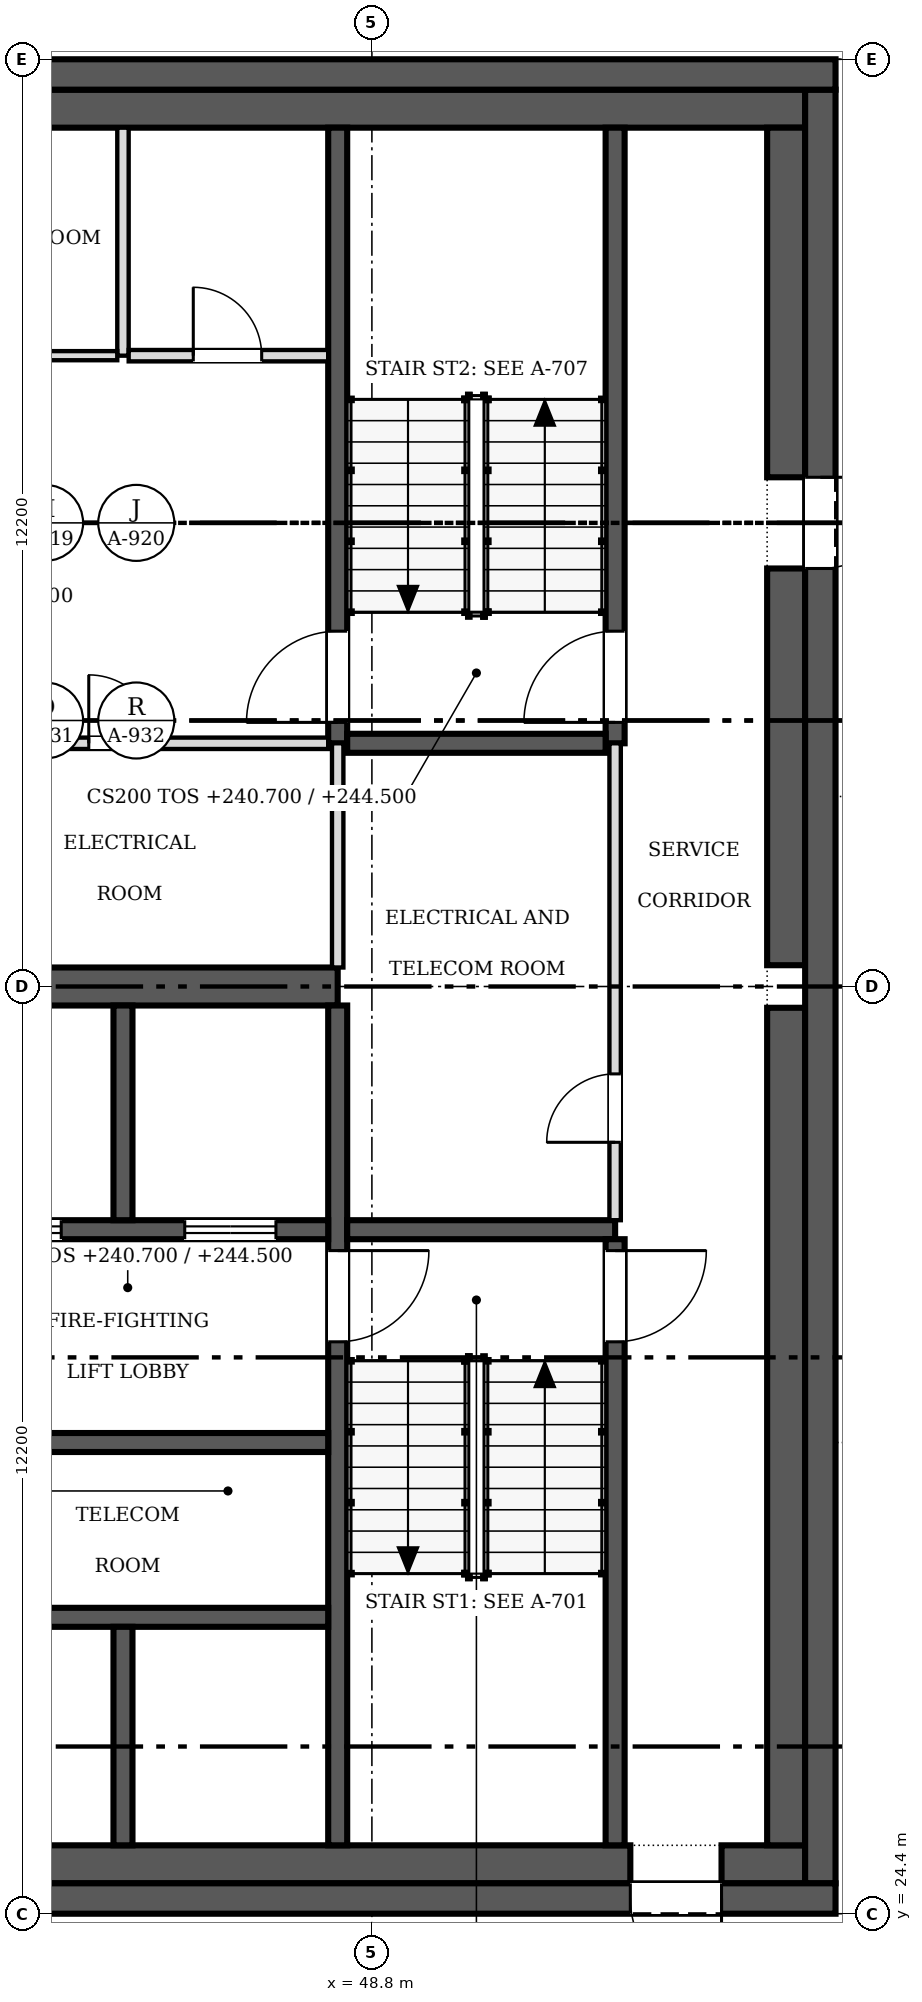
"""IFC4 building model, lengths in metres.
Left out: names, types, materials, properties, quantities, classifications, styles, units other than length and angle.
Written with IfcOpenShell. Run it as: python <this file> out.ifc"""

import sys

from ifc_helpers import new_model, si_unit, direction, frame, frame_2d, origin, place, context, subcontext, project, spatial, rectangle, extrude, source, transform, mapped, element, fill, save


model = new_model("IFC4")
c1 = context("Model", 3, precision=1e-05, world=origin(), true_north=direction((0.0, 1.0)))
c2 = subcontext(c1, "Body", "Model", "MODEL_VIEW")
j1 = project(units=[si_unit("LENGTHUNIT", "METRE"), si_unit("PLANEANGLEUNIT", "RADIAN")], contexts=[c1])
p1 = place(None, origin())
s1 = spatial("IfcSite", under=j1, at=p1, CompositionType="ELEMENT")
p2 = place(p1, origin())
s2 = spatial("IfcBuilding", under=s1, at=p2, CompositionType="ELEMENT")
p3 = place(p2, frame((0.0, 0.0, 240.7)))
s3 = spatial("IfcBuildingStorey", under=s2, at=p3, CompositionType="ELEMENT", Elevation=240.7)
p4 = place(p3, frame((54.9, 24.6, 0.0), z_axis=(0.0, 0.0, 1.0), x_axis=(-1.0, 0.0, 0.0)))
e1 = element("IfcWall", 1, at=p4, inside=s3, PredefinedType="SHEAR", context=c2, shape_type="SweptSolid", body=[
    extrude(rectangle(XDim=24.4, YDim=0.4, at=frame_2d((12.2, 0.0))), origin(), (0.0, 0.0, 1.0), 3.8),
])
m1 = source(origin(), c2, "Body", "SweptSolid", [
    extrude(rectangle(XDim=1.2, YDim=2.1, at=frame_2d((0.6, 1.05))), frame((0.0, 0.21, 0.0), z_axis=(0.0, -1.0, 0.0), x_axis=(1.0, 0.0, 0.0)), (0.0, 0.0, 1.0), 0.42),
])
p5 = place(p4, frame((1.5, 0.0, 0.0)))
e2 = element("IfcOpeningElement", 2, at=p5, cuts=e1, PredefinedType="OPENING", context=c2, shape_type="MappedRepresentation", body=[
    mapped(m1, transform((0.0, 0.0, 0.0), scale=1.0)),
])
p6 = place(p3, frame((30.5, 48.6, 0.0), z_axis=(0.0, 0.0, 1.0), x_axis=(1.0, 0.0, 0.0)))
e3 = element("IfcWall", 3, at=p6, inside=s3, PredefinedType="SHEAR", context=c2, shape_type="SweptSolid", body=[
    extrude(rectangle(XDim=24.4, YDim=0.4, at=frame_2d((12.2, 0.0))), origin(), (0.0, 0.0, 1.0), 3.8),
])
p7 = place(p3, frame((54.7, 48.4, 0.0), z_axis=(0.0, 0.0, 1.0), x_axis=(0.0, -1.0, 0.0)))
e4 = element("IfcWall", 4, at=p7, inside=s3, PredefinedType="SHEAR", context=c2, shape_type="SweptSolid", body=[
    extrude(rectangle(XDim=23.6, YDim=0.4, at=frame_2d((11.8, 0.0))), origin(), (0.0, 0.0, 1.0), 3.8),
])
p8 = place(p7, frame((5.1, 0.0, 0.0)))
e5 = element("IfcOpeningElement", 5, at=p8, cuts=e4, PredefinedType="OPENING", context=c2, shape_type="MappedRepresentation", body=[
    mapped(m1, transform((0.0, 0.0, 0.0), scale=1.0)),
])
p9 = place(p3, frame((30.9, 25.05, 0.0), z_axis=(0.0, 0.0, 1.0), x_axis=(1.0, 0.0, 0.0)))
e6 = element("IfcWall", 6, at=p9, inside=s3, PredefinedType="SOLIDWALL", context=c2, shape_type="SweptSolid", body=[
    extrude(rectangle(XDim=21.3, YDim=0.5, at=frame_2d((10.65, 0.0))), origin(), (0.0, 0.0, 1.0), 3.8),
])
p10 = place(p3, frame((53.4, 25.05, 0.0), z_axis=(0.0, 0.0, 1.0), x_axis=(1.0, 0.0, 0.0)))
e7 = element("IfcWall", 7, at=p10, inside=s3, PredefinedType="SOLIDWALL", context=c2, shape_type="SweptSolid", body=[
    extrude(rectangle(XDim=1.1, YDim=0.5, at=frame_2d((0.55, 0.0))), origin(), (0.0, 0.0, 1.0), 3.8),
])
p11 = place(p3, frame((30.9, 48.15, 0.0), z_axis=(0.0, 0.0, 1.0), x_axis=(1.0, 0.0, 0.0)))
e8 = element("IfcWall", 8, at=p11, inside=s3, PredefinedType="SOLIDWALL", context=c2, shape_type="SweptSolid", body=[
    extrude(rectangle(XDim=23.6, YDim=0.5, at=frame_2d((11.8, 0.0))), origin(), (0.0, 0.0, 1.0), 3.8),
])
p12 = place(p3, frame((54.25, 25.3, 0.0), z_axis=(0.0, 0.0, 1.0), x_axis=(0.0, 1.0, 0.0)))
e9 = element("IfcWall", 9, at=p12, inside=s3, PredefinedType="SOLIDWALL", context=c2, shape_type="SweptSolid", body=[
    extrude(rectangle(XDim=11.02, YDim=0.5, at=frame_2d((5.51, 0.0))), origin(), (0.0, 0.0, 1.0), 3.8),
])
p13 = place(p3, frame((54.25, 36.88, 0.0), z_axis=(0.0, 0.0, 1.0), x_axis=(0.0, 1.0, 0.0)))
e10 = element("IfcWall", 10, at=p13, inside=s3, PredefinedType="SOLIDWALL", context=c2, shape_type="SweptSolid", body=[
    extrude(rectangle(XDim=5.22, YDim=0.5, at=frame_2d((2.61, 0.0))), origin(), (0.0, 0.0, 1.0), 3.8),
])
p14 = place(p3, frame((54.25, 43.3, 0.0), z_axis=(0.0, 0.0, 1.0), x_axis=(0.0, 1.0, 0.0)))
e11 = element("IfcWall", 11, at=p14, inside=s3, PredefinedType="SOLIDWALL", context=c2, shape_type="SweptSolid", body=[
    extrude(rectangle(XDim=4.6, YDim=0.5, at=frame_2d((2.3, 0.0))), origin(), (0.0, 0.0, 1.0), 3.8),
])
p15 = place(p3, frame((31.4, 36.6, 0.0), z_axis=(0.0, 0.0, 1.0), x_axis=(1.0, 0.0, 0.0)))
e12 = element("IfcWall", 12, at=p15, inside=s3, PredefinedType="SHEAR", context=c2, shape_type="SweptSolid", body=[
    extrude(rectangle(XDim=16.95, YDim=0.5, at=frame_2d((8.475, 0.0))), origin(), (0.0, 0.0, 1.0), 3.8),
])
p16 = place(p3, frame((48.35, 36.35, 0.0), z_axis=(0.0, 0.0, 1.0), x_axis=(0.0, -1.0, 0.0)))
e13 = element("IfcWall", 13, at=p16, inside=s3, PredefinedType="SOLIDWALL", context=c2, shape_type="SweptSolid", body=[
    extrude(rectangle(XDim=11.05, YDim=0.25, at=frame_2d((5.525, 0.0))), origin(), (0.0, 0.0, 1.0), 3.8),
])
m2 = source(origin(), c2, "Body", "SweptSolid", [
    extrude(rectangle(XDim=1.2, YDim=2.1, at=frame_2d((0.6, 1.05))), frame((0.0, 0.135, 0.0), z_axis=(0.0, -1.0, 0.0), x_axis=(1.0, 0.0, 0.0)), (0.0, 0.0, 1.0), 0.27),
])
p17 = place(p16, frame((3.225, 0.0, 0.0)))
e14 = element("IfcOpeningElement", 14, at=p17, cuts=e13, PredefinedType="OPENING", context=c2, shape_type="MappedRepresentation", body=[
    mapped(m2, transform((0.0, 0.0, 0.0), scale=1.0)),
])
p18 = place(p3, frame((48.225, 33.4, 0.0), z_axis=(0.0, 0.0, 1.0), x_axis=(-1.0, 0.0, 0.0)))
e15 = element("IfcWall", 15, at=p18, inside=s3, PredefinedType="SOLIDWALL", context=c2, shape_type="SweptSolid", body=[
    extrude(rectangle(XDim=5.275, YDim=0.25, at=frame_2d((2.638, 0.0))), origin(), (0.0, 0.0, 1.0), 3.8),
])
p19 = place(p18, frame((3.512, 0.0, 0.0)))
e16 = element("IfcOpeningElement", 16, at=p19, cuts=e15, PredefinedType="OPENING", context=c2, shape_type="MappedRepresentation", body=[
    mapped(m2, transform((0.0, 0.0, 0.0), scale=1.0)),
])
p20 = place(p18, frame((0.688, 0.0, 0.0)))
e17 = element("IfcOpeningElement", 17, at=p20, cuts=e15, PredefinedType="OPENING", context=c2, shape_type="MappedRepresentation", body=[
    mapped(m2, transform((0.0, 0.0, 0.0), scale=1.0)),
])
p21 = place(p3, frame((48.475, 33.4, 0.0), z_axis=(0.0, 0.0, 1.0), x_axis=(1.0, 0.0, 0.0)))
e18 = element("IfcWall", 18, at=p21, inside=s3, PredefinedType="SOLIDWALL", context=c2, shape_type="SweptSolid", body=[
    extrude(rectangle(XDim=3.525, YDim=0.25, at=frame_2d((1.762, 0.0))), origin(), (0.0, 0.0, 1.0), 3.8),
])
p22 = place(p3, frame((48.35, 47.9, 0.0), z_axis=(0.0, 0.0, 1.0), x_axis=(0.0, -1.0, 0.0)))
e19 = element("IfcWall", 19, at=p22, inside=s3, PredefinedType="SOLIDWALL", context=c2, shape_type="SweptSolid", body=[
    extrude(rectangle(XDim=8.1, YDim=0.25, at=frame_2d((4.05, 0.0))), origin(), (0.0, 0.0, 1.0), 3.8),
])
p23 = place(p22, frame((6.625, 0.0, 0.0)))
e20 = element("IfcOpeningElement", 20, at=p23, cuts=e19, PredefinedType="OPENING", context=c2, shape_type="MappedRepresentation", body=[
    mapped(m2, transform((0.0, 0.0, 0.0), scale=1.0)),
])
p24 = place(p3, frame((52.0, 25.3, 0.0), z_axis=(0.0, 0.0, 1.0), x_axis=(0.0, 1.0, 0.0)))
e21 = element("IfcWall", 21, at=p24, inside=s3, PredefinedType="SOLIDWALL", context=c2, shape_type="SweptSolid", body=[
    extrude(rectangle(XDim=7.975, YDim=0.25, at=frame_2d((3.987, 0.0))), origin(), (0.0, 0.0, 1.0), 3.8),
])
p25 = place(p24, frame((6.625, 0.0, 0.0)))
e22 = element("IfcOpeningElement", 22, at=p25, cuts=e21, PredefinedType="OPENING", context=c2, shape_type="MappedRepresentation", body=[
    mapped(m2, transform((0.0, 0.0, 0.0), scale=1.0)),
])
p26 = place(p3, frame((52.0, 39.8, 0.0), z_axis=(0.0, 0.0, 1.0), x_axis=(0.0, 1.0, 0.0)))
e23 = element("IfcWall", 23, at=p26, inside=s3, PredefinedType="SOLIDWALL", context=c2, shape_type="SweptSolid", body=[
    extrude(rectangle(XDim=8.1, YDim=0.25, at=frame_2d((4.05, 0.0))), origin(), (0.0, 0.0, 1.0), 3.8),
])
p27 = place(p26, frame((0.275, 0.0, 0.0)))
e24 = element("IfcOpeningElement", 24, at=p27, cuts=e23, PredefinedType="OPENING", context=c2, shape_type="MappedRepresentation", body=[
    mapped(m2, transform((0.0, 0.0, 0.0), scale=1.0)),
])
for number, where, z_axis, x_axis in (
    (25, (42.95, 28.3, 0.0), (0.0, 0.0, 1.0), (1.0, 0.0, 0.0)),
    (26, (42.95, 30.6, 0.0), (0.0, 0.0, 1.0), (1.0, 0.0, 0.0)),
):
    element("IfcWall", number, at=place(p3, frame(where, z_axis=z_axis, x_axis=x_axis)), inside=s3, PredefinedType="SOLIDWALL", context=c2, shape_type="SweptSolid", body=[
        extrude(rectangle(XDim=5.275, YDim=0.25, at=frame_2d((2.638, 0.0))), origin(), (0.0, 0.0, 1.0), 3.8),
    ])
p28 = place(p3, frame((48.475, 39.8, 0.0), z_axis=(0.0, 0.0, 1.0), x_axis=(1.0, 0.0, 0.0)))
e27 = element("IfcWall", 27, at=p28, inside=s3, PredefinedType="SOLIDWALL", context=c2, shape_type="SweptSolid", body=[
    extrude(rectangle(XDim=3.4, YDim=0.25, at=frame_2d((1.7, 0.0))), origin(), (0.0, 0.0, 1.0), 3.8),
])
p29 = place(p3, frame((45.525, 33.525, 0.0), z_axis=(0.0, 0.0, 1.0), x_axis=(0.0, 1.0, 0.0)))
e28 = element("IfcWall", 28, at=p29, inside=s3, PredefinedType="SOLIDWALL", context=c2, shape_type="SweptSolid", body=[
    extrude(rectangle(XDim=2.825, YDim=0.25, at=frame_2d((1.413, 0.0))), origin(), (0.0, 0.0, 1.0), 3.8),
])
p30 = place(p3, frame((45.525, 25.3, 0.0), z_axis=(0.0, 0.0, 1.0), x_axis=(0.0, 1.0, 0.0)))
e29 = element("IfcWall", 29, at=p30, inside=s3, PredefinedType="SOLIDWALL", context=c2, shape_type="SweptSolid", body=[
    extrude(rectangle(XDim=2.875, YDim=0.25, at=frame_2d((1.438, 0.0))), origin(), (0.0, 0.0, 1.0), 3.8),
])
p31 = place(p3, frame((52.0, 33.525, 0.0), z_axis=(0.0, 0.0, 1.0), x_axis=(0.0, 1.0, 0.0)))
e30 = element("IfcWall", 30, at=p31, inside=s3, PredefinedType="PARTITIONING", context=c2, shape_type="SweptSolid", body=[
    extrude(rectangle(XDim=6.275, YDim=0.15, at=frame_2d((3.138, 0.0))), origin(), (0.0, 0.0, 1.0), 3.6),
])
m3 = source(origin(), c2, "Body", "SweptSolid", [
    extrude(rectangle(XDim=0.9, YDim=2.1, at=frame_2d((0.45, 1.05))), frame((0.0, 0.085, 0.0), z_axis=(0.0, -1.0, 0.0), x_axis=(1.0, 0.0, 0.0)), (0.0, 0.0, 1.0), 0.17),
])
p32 = place(p31, frame((1.025, 0.0, 0.0)))
e31 = element("IfcOpeningElement", 31, at=p32, cuts=e30, PredefinedType="OPENING", context=c2, shape_type="MappedRepresentation", body=[
    mapped(m3, transform((0.0, 0.0, 0.0), scale=1.0)),
])
p33 = place(p3, frame((48.225, 39.8, 0.0), z_axis=(0.0, 0.0, 1.0), x_axis=(-1.0, 0.0, 0.0)))
e32 = element("IfcWall", 32, at=p33, inside=s3, PredefinedType="PARTITIONING", context=c2, shape_type="SweptSolid", body=[
    extrude(rectangle(XDim=5.275, YDim=0.15, at=frame_2d((2.638, 0.0))), origin(), (0.0, 0.0, 1.0), 3.6),
])
p34 = place(p33, frame((2.25, 0.0, 0.0)))
e33 = element("IfcOpeningElement", 33, at=p34, cuts=e32, PredefinedType="OPENING", context=c2, shape_type="MappedRepresentation", body=[
    mapped(m3, transform((0.0, 0.0, 0.0), scale=1.0)),
])
p35 = place(p3, frame((48.35, 36.85, 0.0), z_axis=(0.0, 0.0, 1.0), x_axis=(0.0, 1.0, 0.0)))
e34 = element("IfcWall", 34, at=p35, inside=s3, PredefinedType="PARTITIONING", context=c2, shape_type="SweptSolid", body=[
    extrude(rectangle(XDim=2.95, YDim=0.15, at=frame_2d((1.475, 0.0))), origin(), (0.0, 0.0, 1.0), 3.6),
])
p36 = place(p3, frame((45.525, 44.9, 0.0), z_axis=(0.0, 0.0, 1.0), x_axis=(0.0, 1.0, 0.0)))
e35 = element("IfcWall", 35, at=p36, inside=s3, PredefinedType="PARTITIONING", context=c2, shape_type="SweptSolid", body=[
    extrude(rectangle(XDim=3.0, YDim=0.15, at=frame_2d((1.5, 0.0))), origin(), (0.0, 0.0, 1.0), 3.6),
])
p37 = place(p3, frame((42.95, 44.9, 0.0), z_axis=(0.0, 0.0, 1.0), x_axis=(1.0, 0.0, 0.0)))
e36 = element("IfcWall", 36, at=p37, inside=s3, PredefinedType="PARTITIONING", context=c2, shape_type="SweptSolid", body=[
    extrude(rectangle(XDim=2.5, YDim=0.12, at=frame_2d((1.25, 0.0))), origin(), (0.0, 0.0, 1.0), 3.6),
])
m4 = source(origin(), c2, "Body", "SweptSolid", [
    extrude(rectangle(XDim=0.9, YDim=2.1, at=frame_2d((0.45, 1.05))), frame((0.0, 0.07, 0.0), z_axis=(0.0, -1.0, 0.0), x_axis=(1.0, 0.0, 0.0)), (0.0, 0.0, 1.0), 0.14),
])
p38 = place(p37, frame((0.712, 0.0, 0.0)))
e37 = element("IfcOpeningElement", 37, at=p38, cuts=e36, PredefinedType="OPENING", context=c2, shape_type="MappedRepresentation", body=[
    mapped(m4, transform((0.0, 0.0, 0.0), scale=1.0)),
])
p39 = place(p3, frame((45.6, 44.9, 0.0), z_axis=(0.0, 0.0, 1.0), x_axis=(1.0, 0.0, 0.0)))
e38 = element("IfcWall", 38, at=p39, inside=s3, PredefinedType="PARTITIONING", context=c2, shape_type="SweptSolid", body=[
    extrude(rectangle(XDim=2.625, YDim=0.15, at=frame_2d((1.312, 0.0))), origin(), (0.0, 0.0, 1.0), 3.6),
])
p40 = place(p39, frame((0.85, 0.0, 0.0)))
e39 = element("IfcOpeningElement", 39, at=p40, cuts=e38, PredefinedType="OPENING", context=c2, shape_type="MappedRepresentation", body=[
    mapped(m3, transform((0.0, 0.0, 0.0), scale=1.0)),
])
m5 = source(origin(), c2, "Body", "SweptSolid", [
    extrude(rectangle(XDim=1.2, YDim=2.1, at=frame_2d((0.6, 1.05))), frame((0.0, 0.025, 0.0), z_axis=(0.0, -1.0, 0.0), x_axis=(1.0, 0.0, 0.0)), (0.0, 0.0, 1.0), 0.05),
])
p41 = place(p5, origin())
e40 = element("IfcDoor", 40, at=p41, inside=s3, OperationType="SINGLE_SWING_LEFT", PredefinedType="DOOR", context=c2, shape_type="MappedRepresentation", body=[
    mapped(m5, transform((0.0, 0.0, 0.0), scale=1.0)),
])
fill(e2, e40)
p42 = place(p8, origin())
e41 = element("IfcDoor", 41, at=p42, inside=s3, OperationType="SINGLE_SWING_LEFT", PredefinedType="DOOR", context=c2, shape_type="MappedRepresentation", body=[
    mapped(m5, transform((0.0, 0.0, 0.0), scale=1.0)),
])
fill(e5, e41)
p43 = place(p17, origin())
e42 = element("IfcDoor", 42, at=p43, inside=s3, OperationType="SINGLE_SWING_LEFT", PredefinedType="DOOR", context=c2, shape_type="MappedRepresentation", body=[
    mapped(m5, transform((0.0, 0.0, 0.0), scale=1.0)),
])
fill(e14, e42)
p44 = place(p19, origin())
e43 = element("IfcDoor", 43, at=p44, inside=s3, OperationType="DOUBLE_DOOR_SLIDING", PredefinedType="DOOR", context=c2, shape_type="MappedRepresentation", body=[
    mapped(m5, transform((0.0, 0.0, 0.0), scale=1.0)),
])
fill(e16, e43)
p45 = place(p20, origin())
e44 = element("IfcDoor", 44, at=p45, inside=s3, OperationType="DOUBLE_DOOR_SLIDING", PredefinedType="DOOR", context=c2, shape_type="MappedRepresentation", body=[
    mapped(m5, transform((0.0, 0.0, 0.0), scale=1.0)),
])
fill(e17, e44)
p46 = place(p23, origin())
e45 = element("IfcDoor", 45, at=p46, inside=s3, OperationType="SINGLE_SWING_RIGHT", PredefinedType="DOOR", context=c2, shape_type="MappedRepresentation", body=[
    mapped(m5, transform((0.0, 0.0, 0.0), scale=1.0)),
])
fill(e20, e45)
p47 = place(p25, origin())
e46 = element("IfcDoor", 46, at=p47, inside=s3, OperationType="SINGLE_SWING_RIGHT", PredefinedType="DOOR", context=c2, shape_type="MappedRepresentation", body=[
    mapped(m5, transform((0.0, 0.0, 0.0), scale=1.0)),
])
fill(e22, e46)
p48 = place(p27, origin())
e47 = element("IfcDoor", 47, at=p48, inside=s3, OperationType="SINGLE_SWING_LEFT", PredefinedType="DOOR", context=c2, shape_type="MappedRepresentation", body=[
    mapped(m5, transform((0.0, 0.0, 0.0), scale=1.0)),
])
fill(e24, e47)
m6 = source(origin(), c2, "Body", "SweptSolid", [
    extrude(rectangle(XDim=0.9, YDim=2.1, at=frame_2d((0.45, 1.05))), frame((0.0, 0.025, 0.0), z_axis=(0.0, -1.0, 0.0), x_axis=(1.0, 0.0, 0.0)), (0.0, 0.0, 1.0), 0.05),
])
p49 = place(p32, origin())
e48 = element("IfcDoor", 48, at=p49, inside=s3, OperationType="SINGLE_SWING_LEFT", PredefinedType="DOOR", context=c2, shape_type="MappedRepresentation", body=[
    mapped(m6, transform((0.0, 0.0, 0.0), scale=1.0)),
])
fill(e31, e48)
p50 = place(p34, origin())
e49 = element("IfcDoor", 49, at=p50, inside=s3, OperationType="SINGLE_SWING_RIGHT", PredefinedType="DOOR", context=c2, shape_type="MappedRepresentation", body=[
    mapped(m6, transform((0.0, 0.0, 0.0), scale=1.0)),
])
fill(e33, e49)
p51 = place(p40, origin())
e50 = element("IfcDoor", 50, at=p51, inside=s3, OperationType="SINGLE_SWING_LEFT", PredefinedType="DOOR", context=c2, shape_type="MappedRepresentation", body=[
    mapped(m6, transform((0.0, 0.0, 0.0), scale=1.0)),
])
fill(e39, e50)
save(model, sys.argv[1])
